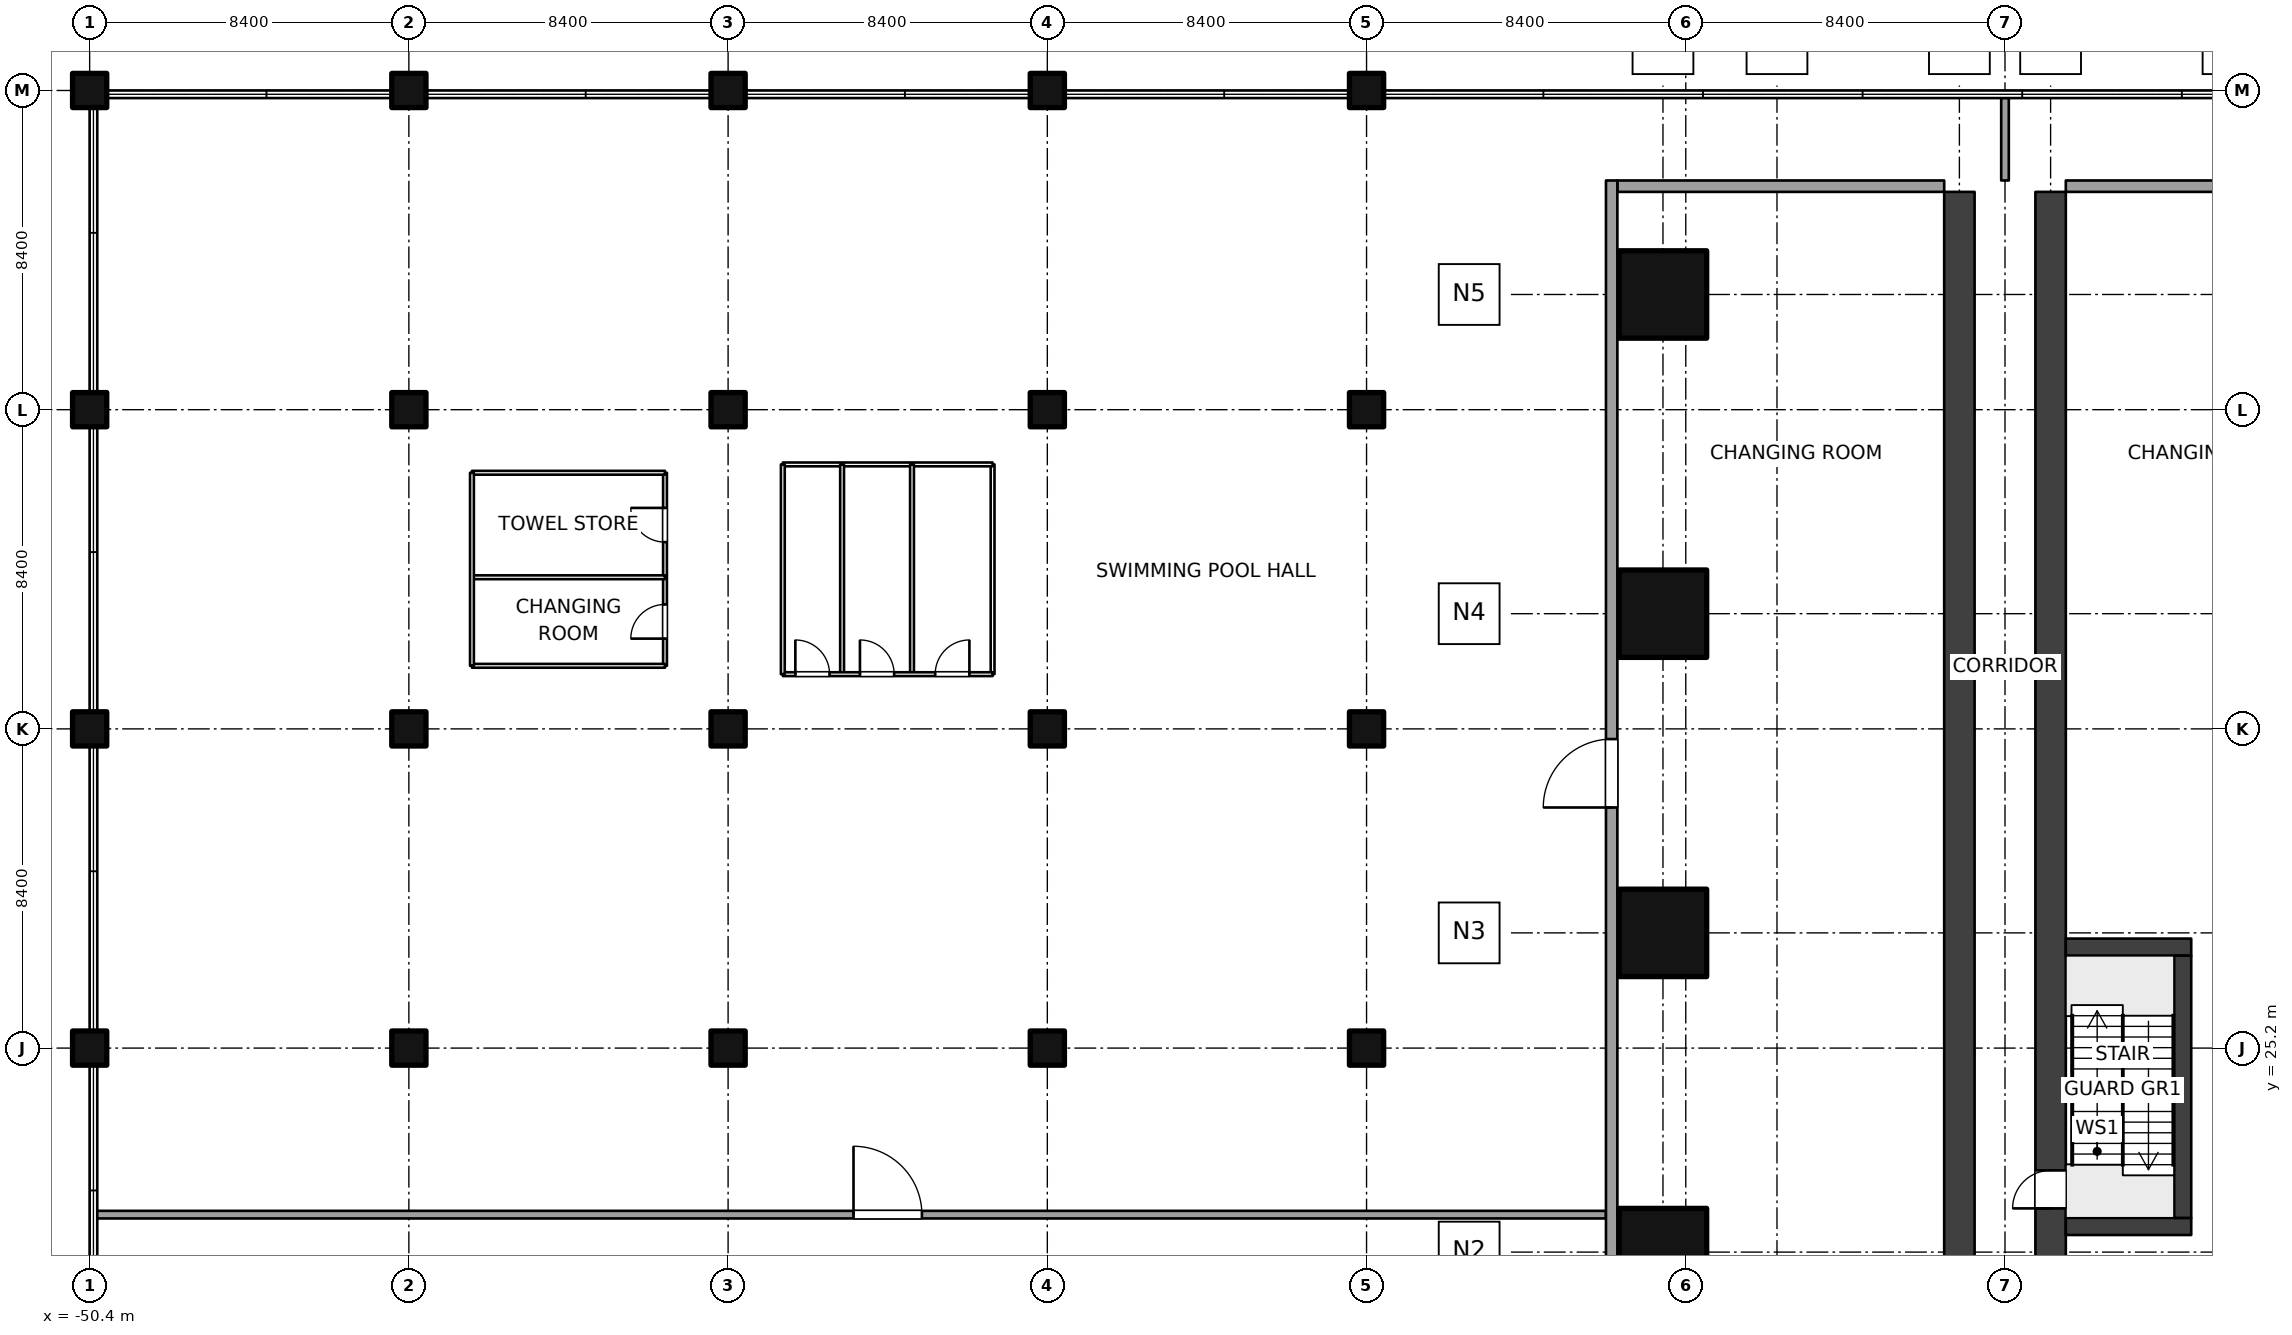
"""IFC4 building model, lengths in metres.
Left out: names, types, materials, properties, quantities, classifications, styles, units other than length and angle.
Written with IfcOpenShell. Run it as: python <this file> out.ifc"""

import sys

from ifc_helpers import new_model, si_unit, direction, frame, frame_2d, origin, origin_2d, place, context, subcontext, project, spatial, rectangle, extrude, element, fill, save


model = new_model("IFC4")
c1 = context("Model", 3, precision=1e-05, world=origin(), true_north=direction((0.0, 1.0)))
c2 = subcontext(c1, "Body", "Model", "MODEL_VIEW")
j1 = project(units=[si_unit("LENGTHUNIT", "METRE"), si_unit("PLANEANGLEUNIT", "RADIAN")], contexts=[c1])
p1 = place(None, origin())
s1 = spatial("IfcSite", under=j1, at=p1, CompositionType="ELEMENT")
p2 = place(p1, origin())
s2 = spatial("IfcBuilding", under=s1, at=p2, CompositionType="ELEMENT")
p3 = place(p2, frame((0.0, 0.0, 11.0)))
s3 = spatial("IfcBuildingStorey", under=s2, at=p3, CompositionType="ELEMENT", Elevation=11.0)
for number, where, z_axis, x_axis in (
    (1, (-9.0, 19.832, 0.0), (0.0, 0.0, 1.0), (1.0, 0.0, 0.0)),
    (2, (-9.0, 28.231, 0.0), (0.0, 0.0, 1.0), (1.0, 0.0, 0.0)),
    (3, (-9.0, 36.632, 0.0), (0.0, 0.0, 1.0), (1.0, 0.0, 0.0)),
    (4, (-9.0, 45.031, 0.0), (0.0, 0.0, 1.0), (1.0, 0.0, 0.0)),
):
    element("IfcColumn", number, at=place(p3, frame(where, z_axis=z_axis, x_axis=x_axis)), inside=s3, PredefinedType="COLUMN", context=c2, shape_type="SweptSolid", body=[
        extrude(rectangle(XDim=2.3, YDim=2.3, at=origin_2d()), origin(), (0.0, 0.0, 1.0), 5.0),
    ])
for number, where, z_axis, x_axis in (
    (5, (-50.4, 25.2, 0.0), (0.0, 0.0, 1.0), (1.0, 0.0, 0.0)),
    (6, (-50.4, 33.6, 0.0), (0.0, 0.0, 1.0), (1.0, 0.0, 0.0)),
    (7, (-50.4, 42.0, 0.0), (0.0, 0.0, 1.0), (1.0, 0.0, 0.0)),
    (8, (-50.4, 50.4, 0.0), (0.0, 0.0, 1.0), (1.0, 0.0, 0.0)),
    (9, (-42.0, 25.2, 0.0), (0.0, 0.0, 1.0), (1.0, 0.0, 0.0)),
    (10, (-42.0, 33.6, 0.0), (0.0, 0.0, 1.0), (1.0, 0.0, 0.0)),
    (11, (-42.0, 42.0, 0.0), (0.0, 0.0, 1.0), (1.0, 0.0, 0.0)),
    (12, (-42.0, 50.4, 0.0), (0.0, 0.0, 1.0), (1.0, 0.0, 0.0)),
    (13, (-33.6, 25.2, 0.0), (0.0, 0.0, 1.0), (1.0, 0.0, 0.0)),
    (14, (-33.6, 33.6, 0.0), (0.0, 0.0, 1.0), (1.0, 0.0, 0.0)),
    (15, (-33.6, 42.0, 0.0), (0.0, 0.0, 1.0), (1.0, 0.0, 0.0)),
    (16, (-33.6, 50.4, 0.0), (0.0, 0.0, 1.0), (1.0, 0.0, 0.0)),
    (17, (-25.2, 25.2, 0.0), (0.0, 0.0, 1.0), (1.0, 0.0, 0.0)),
    (18, (-25.2, 33.6, 0.0), (0.0, 0.0, 1.0), (1.0, 0.0, 0.0)),
    (19, (-25.2, 42.0, 0.0), (0.0, 0.0, 1.0), (1.0, 0.0, 0.0)),
    (20, (-25.2, 50.4, 0.0), (0.0, 0.0, 1.0), (1.0, 0.0, 0.0)),
    (21, (-16.8, 25.2, 0.0), (0.0, 0.0, 1.0), (1.0, 0.0, 0.0)),
    (22, (-16.8, 33.6, 0.0), (0.0, 0.0, 1.0), (1.0, 0.0, 0.0)),
    (23, (-16.8, 42.0, 0.0), (0.0, 0.0, 1.0), (1.0, 0.0, 0.0)),
    (24, (-16.8, 50.4, 0.0), (0.0, 0.0, 1.0), (1.0, 0.0, 0.0)),
):
    element("IfcColumn", number, at=place(p3, frame(where, z_axis=z_axis, x_axis=x_axis)), inside=s3, PredefinedType="COLUMN", context=c2, shape_type="SweptSolid", body=[
        extrude(rectangle(XDim=0.9, YDim=0.9, at=origin_2d()), origin(), (0.0, 0.0, 1.0), 5.0),
    ])
p4 = place(p3, frame((-1.2, 10.981, 0.0), z_axis=(0.0, 0.0, 1.0), x_axis=(0.0, 1.0, 0.0)))
e25 = element("IfcWall", 25, at=p4, inside=s3, PredefinedType="SHEAR", context=c2, shape_type="SweptSolid", body=[
    extrude(rectangle(XDim=36.75, YDim=0.8, at=frame_2d((18.375, 0.0))), origin(), (0.0, 0.0, 1.0), 5.0),
])
p5 = place(p4, frame((2.85, 0.0, 0.0)))
e26 = element("IfcOpeningElement", 26, at=p5, cuts=e25, PredefinedType="OPENING", context=c2, shape_type="SweptSolid", body=[
    extrude(rectangle(XDim=1.2, YDim=2.1, at=frame_2d((0.6, 1.05))), frame((0.0, 0.41, 0.0), z_axis=(0.0, -1.0, 0.0), x_axis=(1.0, 0.0, 0.0)), (0.0, 0.0, 1.0), 0.82),
])
p6 = place(p3, frame((1.2, 10.981, 0.0), z_axis=(0.0, 0.0, 1.0), x_axis=(0.0, 1.0, 0.0)))
e27 = element("IfcWall", 27, at=p6, inside=s3, PredefinedType="SHEAR", context=c2, shape_type="SweptSolid", body=[
    extrude(rectangle(XDim=36.75, YDim=0.8, at=frame_2d((18.375, 0.0))), origin(), (0.0, 0.0, 1.0), 5.0),
])
p7 = place(p6, frame((10.0, 0.0, 0.0)))
e28 = element("IfcOpeningElement", 28, at=p7, cuts=e27, PredefinedType="OPENING", context=c2, shape_type="SweptSolid", body=[
    extrude(rectangle(XDim=1.0, YDim=2.1, at=frame_2d((0.5, 1.05))), frame((0.0, 0.41, 0.0), z_axis=(0.0, -1.0, 0.0), x_axis=(1.0, 0.0, 0.0)), (0.0, 0.0, 1.0), 0.82),
])
p8 = place(p6, frame((2.85, 0.0, 0.0)))
e29 = element("IfcOpeningElement", 29, at=p8, cuts=e27, PredefinedType="OPENING", context=c2, shape_type="SweptSolid", body=[
    extrude(rectangle(XDim=1.2, YDim=2.1, at=frame_2d((0.6, 1.05))), frame((0.0, 0.41, 0.0), z_axis=(0.0, -1.0, 0.0), x_axis=(1.0, 0.0, 0.0)), (0.0, 0.0, 1.0), 0.82),
])
p9 = place(p3, frame((0.0, 48.031, 0.0), z_axis=(0.0, 0.0, 1.0), x_axis=(0.0, 1.0, 0.0)))
e30 = element("IfcWall", 30, at=p9, inside=s3, PredefinedType="SOLIDWALL", context=c2, shape_type="SweptSolid", body=[
    extrude(rectangle(XDim=2.176, YDim=0.2, at=frame_2d((1.088, 0.0))), origin(), (0.0, 0.0, 1.0), 4.7),
])
p10 = place(p3, frame((-50.237, 20.817, 0.0), z_axis=(0.0, 0.0, 1.0), x_axis=(1.0, 0.0, 0.0)))
e31 = element("IfcWall", 31, at=p10, inside=s3, PredefinedType="SOLIDWALL", context=c2, shape_type="SweptSolid", body=[
    extrude(rectangle(XDim=39.737, YDim=0.2, at=frame_2d((19.869, 0.0))), origin(), (0.0, 0.0, 1.0), 4.7),
])
p11 = place(p10, frame((19.937, 0.0, 0.0)))
e32 = element("IfcOpeningElement", 32, at=p11, cuts=e31, PredefinedType="OPENING", context=c2, shape_type="SweptSolid", body=[
    extrude(rectangle(XDim=1.8, YDim=2.4, at=frame_2d((0.9, 1.2))), frame((0.0, 0.11, 0.0), z_axis=(0.0, -1.0, 0.0), x_axis=(1.0, 0.0, 0.0)), (0.0, 0.0, 1.0), 0.22),
])
p12 = place(p3, frame((-32.16, 35.04, 0.0), z_axis=(0.0, 0.0, 1.0), x_axis=(1.0, 0.0, 0.0)))
e33 = element("IfcWall", 33, at=p12, inside=s3, PredefinedType="PARTITIONING", context=c2, shape_type="SweptSolid", body=[
    extrude(rectangle(XDim=5.52, YDim=0.1, at=frame_2d((2.76, 0.0))), origin(), (0.0, 0.0, 1.0), 4.7),
])
p13 = place(p12, frame((0.33, 0.0, 0.0)))
e34 = element("IfcOpeningElement", 34, at=p13, cuts=e33, PredefinedType="OPENING", context=c2, shape_type="SweptSolid", body=[
    extrude(rectangle(XDim=0.9, YDim=2.1, at=frame_2d((0.45, 1.05))), frame((0.0, 0.06, 0.0), z_axis=(0.0, -1.0, 0.0), x_axis=(1.0, 0.0, 0.0)), (0.0, 0.0, 1.0), 0.12),
])
p14 = place(p12, frame((2.029, 0.0, 0.0)))
e35 = element("IfcOpeningElement", 35, at=p14, cuts=e33, PredefinedType="OPENING", context=c2, shape_type="SweptSolid", body=[
    extrude(rectangle(XDim=0.9, YDim=2.1, at=frame_2d((0.45, 1.05))), frame((0.0, 0.06, 0.0), z_axis=(0.0, -1.0, 0.0), x_axis=(1.0, 0.0, 0.0)), (0.0, 0.0, 1.0), 0.12),
])
p15 = place(p12, frame((4.01, 0.0, 0.0)))
e36 = element("IfcOpeningElement", 36, at=p15, cuts=e33, PredefinedType="OPENING", context=c2, shape_type="SweptSolid", body=[
    extrude(rectangle(XDim=0.9, YDim=2.1, at=frame_2d((0.45, 1.05))), frame((0.0, 0.06, 0.0), z_axis=(0.0, -1.0, 0.0), x_axis=(1.0, 0.0, 0.0)), (0.0, 0.0, 1.0), 0.12),
])
for number, where, z_axis, x_axis in (
    (37, (-26.64, 35.04, 0.0), (0.0, 0.0, 1.0), (0.0, 1.0, 0.0)),
    (38, (-26.64, 40.56, 0.0), (0.0, 0.0, 1.0), (-1.0, 0.0, 0.0)),
    (39, (-32.16, 40.56, 0.0), (0.0, 0.0, 1.0), (0.0, -1.0, 0.0)),
    (40, (-30.601, 35.04, 0.0), (0.0, 0.0, 1.0), (0.0, 1.0, 0.0)),
    (41, (-28.761, 35.04, 0.0), (0.0, 0.0, 1.0), (0.0, 1.0, 0.0)),
):
    element("IfcWall", number, at=place(p3, frame(where, z_axis=z_axis, x_axis=x_axis)), inside=s3, PredefinedType="PARTITIONING", context=c2, shape_type="SweptSolid", body=[
        extrude(rectangle(XDim=5.52, YDim=0.1, at=frame_2d((2.76, 0.0))), origin(), (0.0, 0.0, 1.0), 4.7),
    ])
p16 = place(p3, frame((-40.34, 35.26, 0.0), z_axis=(0.0, 0.0, 1.0), x_axis=(1.0, 0.0, 0.0)))
e42 = element("IfcWall", 42, at=p16, inside=s3, PredefinedType="PARTITIONING", context=c2, shape_type="SweptSolid", body=[
    extrude(rectangle(XDim=5.08, YDim=0.1, at=frame_2d((2.54, 0.0))), origin(), (0.0, 0.0, 1.0), 4.7),
])
p17 = place(p3, frame((-35.26, 35.26, 0.0), z_axis=(0.0, 0.0, 1.0), x_axis=(0.0, 1.0, 0.0)))
e43 = element("IfcWall", 43, at=p17, inside=s3, PredefinedType="PARTITIONING", context=c2, shape_type="SweptSolid", body=[
    extrude(rectangle(XDim=5.08, YDim=0.1, at=frame_2d((2.54, 0.0))), origin(), (0.0, 0.0, 1.0), 4.7),
])
p18 = place(p17, frame((0.715, 0.0, 0.0)))
e44 = element("IfcOpeningElement", 44, at=p18, cuts=e43, PredefinedType="OPENING", context=c2, shape_type="SweptSolid", body=[
    extrude(rectangle(XDim=0.9, YDim=2.1, at=frame_2d((0.45, 1.05))), frame((0.0, 0.06, 0.0), z_axis=(0.0, -1.0, 0.0), x_axis=(1.0, 0.0, 0.0)), (0.0, 0.0, 1.0), 0.12),
])
p19 = place(p17, frame((3.255, 0.0, 0.0)))
e45 = element("IfcOpeningElement", 45, at=p19, cuts=e43, PredefinedType="OPENING", context=c2, shape_type="SweptSolid", body=[
    extrude(rectangle(XDim=0.9, YDim=2.1, at=frame_2d((0.45, 1.05))), frame((0.0, 0.06, 0.0), z_axis=(0.0, -1.0, 0.0), x_axis=(1.0, 0.0, 0.0)), (0.0, 0.0, 1.0), 0.12),
])
for number, where, z_axis, x_axis in (
    (46, (-35.26, 40.34, 0.0), (0.0, 0.0, 1.0), (-1.0, 0.0, 0.0)),
    (47, (-40.34, 40.34, 0.0), (0.0, 0.0, 1.0), (0.0, -1.0, 0.0)),
    (48, (-40.34, 37.59, 0.0), (0.0, 0.0, 1.0), (1.0, 0.0, 0.0)),
):
    element("IfcWall", number, at=place(p3, frame(where, z_axis=z_axis, x_axis=x_axis)), inside=s3, PredefinedType="PARTITIONING", context=c2, shape_type="SweptSolid", body=[
        extrude(rectangle(XDim=5.08, YDim=0.1, at=frame_2d((2.54, 0.0))), origin(), (0.0, 0.0, 1.0), 4.7),
    ])
for number, where, z_axis, x_axis in (
    (49, (-1.6, 47.882, 0.0), (0.0, 0.0, 1.0), (-1.0, 0.0, 0.0)),
    (50, (1.6, 47.882, 0.0), (0.0, 0.0, 1.0), (1.0, 0.0, 0.0)),
):
    element("IfcWall", number, at=place(p3, frame(where, z_axis=z_axis, x_axis=x_axis)), inside=s3, PredefinedType="SOLIDWALL", context=c2, shape_type="SweptSolid", body=[
        extrude(rectangle(XDim=8.6, YDim=0.3, at=frame_2d((4.3, 0.0))), origin(), (0.0, 0.0, 1.0), 3.1),
    ])
p20 = place(p3, frame((-10.35, 6.149, 0.0), z_axis=(0.0, 0.0, 1.0), x_axis=(0.0, 1.0, 0.0)))
e51 = element("IfcWall", 51, at=p20, inside=s3, PredefinedType="SOLIDWALL", context=c2, shape_type="SweptSolid", body=[
    extrude(rectangle(XDim=41.883, YDim=0.3, at=frame_2d((20.941, 0.0))), origin(), (0.0, 0.0, 1.0), 4.7),
])
p21 = place(p20, frame((25.383, 0.0, 0.0)))
e52 = element("IfcOpeningElement", 52, at=p21, cuts=e51, PredefinedType="OPENING", context=c2, shape_type="SweptSolid", body=[
    extrude(rectangle(XDim=1.8, YDim=2.4, at=frame_2d((0.9, 1.2))), frame((0.0, 0.16, 0.0), z_axis=(0.0, -1.0, 0.0), x_axis=(1.0, 0.0, 0.0)), (0.0, 0.0, 1.0), 0.32),
])
for number, where, z_axis, x_axis in (
    (53, (1.6, 20.507, 0.0), (0.0, 0.0, 1.0), (1.0, 0.0, 0.0)),
    (54, (1.6, 27.856, 0.0), (0.0, 0.0, 1.0), (1.0, 0.0, 0.0)),
):
    element("IfcWall", number, at=place(p3, frame(where, z_axis=z_axis, x_axis=x_axis)), inside=s3, PredefinedType="SOLIDWALL", context=c2, shape_type="SweptSolid", body=[
        extrude(rectangle(XDim=3.3, YDim=0.45, at=frame_2d((1.65, 0.0))), origin(), (0.0, 0.0, 1.0), 5.0),
    ])
p22 = place(p3, frame((4.675, 20.731, 0.0), z_axis=(0.0, 0.0, 1.0), x_axis=(0.0, 1.0, 0.0)))
e55 = element("IfcWall", 55, at=p22, inside=s3, PredefinedType="SOLIDWALL", context=c2, shape_type="SweptSolid", body=[
    extrude(rectangle(XDim=6.9, YDim=0.45, at=frame_2d((3.45, 0.0))), origin(), (0.0, 0.0, 1.0), 5.0),
])
p23 = place(p7, origin())
e56 = element("IfcDoor", 56, at=p23, inside=s3, OperationType="SINGLE_SWING_LEFT", PredefinedType="DOOR", context=c2, shape_type="SweptSolid", body=[
    extrude(rectangle(XDim=1.0, YDim=2.1, at=frame_2d((0.5, 1.05))), frame((0.0, 0.025, 0.0), z_axis=(0.0, -1.0, 0.0), x_axis=(1.0, 0.0, 0.0)), (0.0, 0.0, 1.0), 0.05),
])
fill(e28, e56)
p24 = place(p11, origin())
e57 = element("IfcDoor", 57, at=p24, inside=s3, OperationType="DOUBLE_DOOR_DOUBLE_SWING", PredefinedType="DOOR", context=c2, shape_type="SweptSolid", body=[
    extrude(rectangle(XDim=1.8, YDim=2.4, at=frame_2d((0.9, 1.2))), frame((0.0, 0.025, 0.0), z_axis=(0.0, -1.0, 0.0), x_axis=(1.0, 0.0, 0.0)), (0.0, 0.0, 1.0), 0.05),
])
fill(e32, e57)
p25 = place(p13, origin())
e58 = element("IfcDoor", 58, at=p25, inside=s3, OperationType="SINGLE_SWING_LEFT", PredefinedType="DOOR", context=c2, shape_type="SweptSolid", body=[
    extrude(rectangle(XDim=0.9, YDim=2.1, at=frame_2d((0.45, 1.05))), frame((0.0, 0.025, 0.0), z_axis=(0.0, -1.0, 0.0), x_axis=(1.0, 0.0, 0.0)), (0.0, 0.0, 1.0), 0.05),
])
fill(e34, e58)
p26 = place(p14, origin())
e59 = element("IfcDoor", 59, at=p26, inside=s3, OperationType="SINGLE_SWING_LEFT", PredefinedType="DOOR", context=c2, shape_type="SweptSolid", body=[
    extrude(rectangle(XDim=0.9, YDim=2.1, at=frame_2d((0.45, 1.05))), frame((0.0, 0.025, 0.0), z_axis=(0.0, -1.0, 0.0), x_axis=(1.0, 0.0, 0.0)), (0.0, 0.0, 1.0), 0.05),
])
fill(e35, e59)
p27 = place(p15, origin())
e60 = element("IfcDoor", 60, at=p27, inside=s3, OperationType="SINGLE_SWING_RIGHT", PredefinedType="DOOR", context=c2, shape_type="SweptSolid", body=[
    extrude(rectangle(XDim=0.9, YDim=2.1, at=frame_2d((0.45, 1.05))), frame((0.0, 0.025, 0.0), z_axis=(0.0, -1.0, 0.0), x_axis=(1.0, 0.0, 0.0)), (0.0, 0.0, 1.0), 0.05),
])
fill(e36, e60)
p28 = place(p18, origin())
e61 = element("IfcDoor", 61, at=p28, inside=s3, OperationType="SINGLE_SWING_LEFT", PredefinedType="DOOR", context=c2, shape_type="SweptSolid", body=[
    extrude(rectangle(XDim=0.9, YDim=2.1, at=frame_2d((0.45, 1.05))), frame((0.0, 0.025, 0.0), z_axis=(0.0, -1.0, 0.0), x_axis=(1.0, 0.0, 0.0)), (0.0, 0.0, 1.0), 0.05),
])
fill(e44, e61)
p29 = place(p19, origin())
e62 = element("IfcDoor", 62, at=p29, inside=s3, OperationType="SINGLE_SWING_RIGHT", PredefinedType="DOOR", context=c2, shape_type="SweptSolid", body=[
    extrude(rectangle(XDim=0.9, YDim=2.1, at=frame_2d((0.45, 1.05))), frame((0.0, 0.025, 0.0), z_axis=(0.0, -1.0, 0.0), x_axis=(1.0, 0.0, 0.0)), (0.0, 0.0, 1.0), 0.05),
])
fill(e45, e62)
p30 = place(p21, origin())
e63 = element("IfcDoor", 63, at=p30, inside=s3, OperationType="DOUBLE_DOOR_DOUBLE_SWING", PredefinedType="DOOR", context=c2, shape_type="SweptSolid", body=[
    extrude(rectangle(XDim=1.8, YDim=2.4, at=frame_2d((0.9, 1.2))), frame((0.0, 0.025, 0.0), z_axis=(0.0, -1.0, 0.0), x_axis=(1.0, 0.0, 0.0)), (0.0, 0.0, 1.0), 0.05),
])
fill(e52, e63)
save(model, sys.argv[1])
